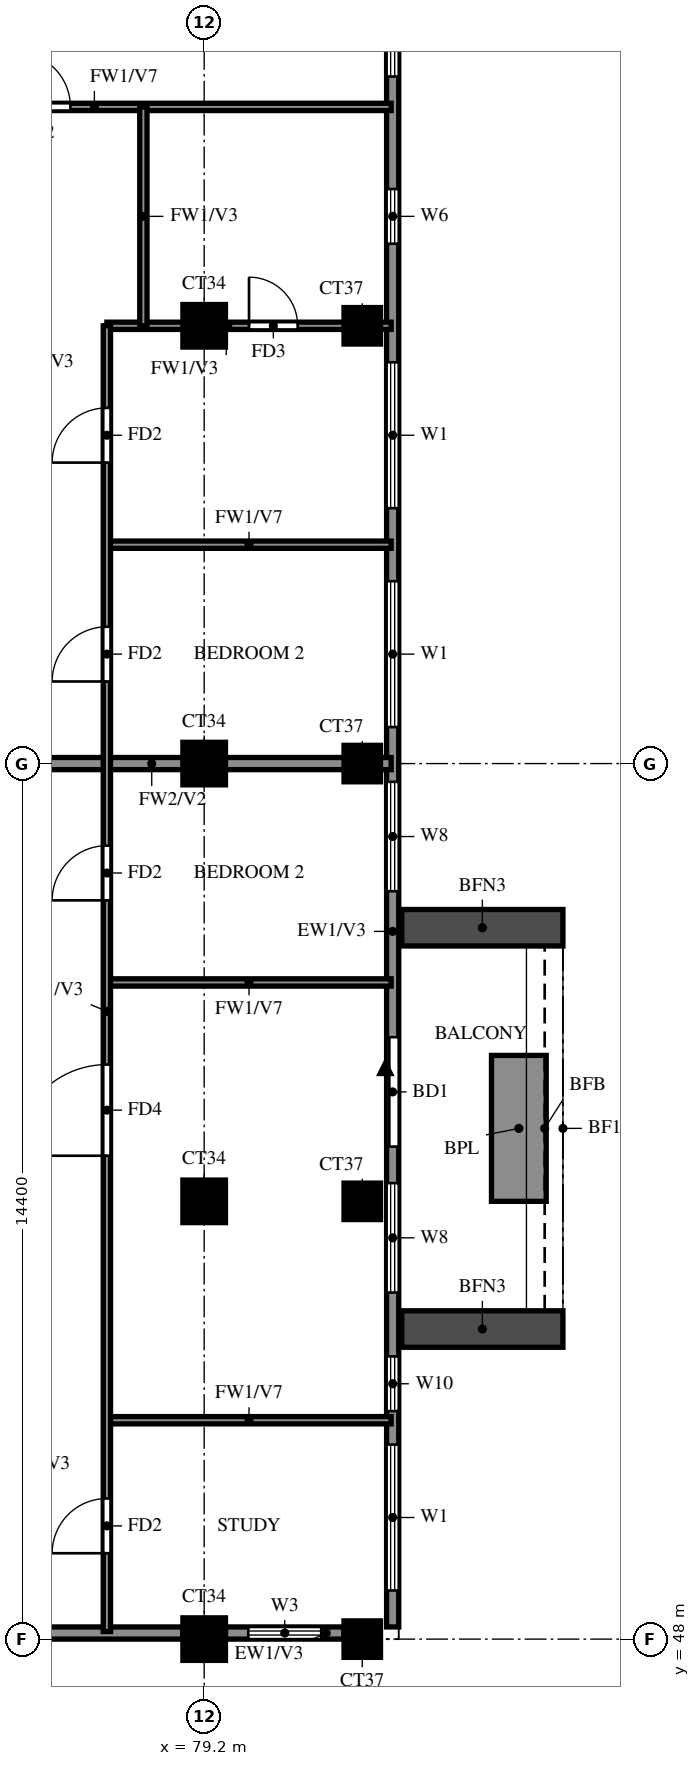
"""IFC4 building model, lengths in metres.
Left out: names, types, materials, properties, quantities, classifications, styles, units other than length and angle.
Written with IfcOpenShell. Run it as: python <this file> out.ifc"""

import sys

from ifc_helpers import new_model, si_unit, direction, frame, frame_2d, origin, origin_2d, place, context, subcontext, project, spatial, rectangle, extrude, source, transform, mapped, element, fill, save


model = new_model("IFC4")
c1 = context("Model", 3, precision=1e-05, world=origin(), true_north=direction((0.0, 1.0)))
c2 = subcontext(c1, "Body", "Model", "MODEL_VIEW")
j1 = project(units=[si_unit("LENGTHUNIT", "METRE"), si_unit("PLANEANGLEUNIT", "RADIAN")], contexts=[c1])
p1 = place(None, origin())
s1 = spatial("IfcSite", under=j1, at=p1, CompositionType="ELEMENT")
p2 = place(p1, origin())
s2 = spatial("IfcBuilding", under=s1, at=p2, CompositionType="ELEMENT")
p3 = place(p2, frame((0.0, 0.0, 264.0)))
s3 = spatial("IfcBuildingStorey", under=s2, at=p3, CompositionType="ELEMENT", Elevation=264.0)
m1 = source(origin(), c2, "Body", "SweptSolid", [
    extrude(rectangle(XDim=0.7, YDim=0.7, at=origin_2d()), origin(), (0.0, 0.0, 1.0), 3.22),
])
p4 = place(p3, frame((79.2, 48.0, 0.0), z_axis=(0.0, 0.0, 1.0), x_axis=(1.0, 0.0, 0.0)))
e1 = element("IfcColumn", 1, at=p4, inside=s3, PredefinedType="COLUMN", context=c2, shape_type="MappedRepresentation", body=[
    mapped(m1, transform((0.0, 0.0, 0.0))),
])
m2 = source(origin(), c2, "Body", "SweptSolid", [
    extrude(rectangle(XDim=0.6, YDim=0.6, at=origin_2d()), origin(), (0.0, 0.0, 1.0), 3.22),
])
p5 = place(p3, frame((81.8, 48.0, 0.0), z_axis=(0.0, 0.0, 1.0), x_axis=(1.0, 0.0, 0.0)))
e2 = element("IfcColumn", 2, at=p5, inside=s3, PredefinedType="COLUMN", context=c2, shape_type="MappedRepresentation", body=[
    mapped(m2, transform((0.0, 0.0, 0.0))),
])
p6 = place(p3, frame((79.2, 55.2, 0.0), z_axis=(0.0, 0.0, 1.0), x_axis=(1.0, 0.0, 0.0)))
e3 = element("IfcColumn", 3, at=p6, inside=s3, PredefinedType="COLUMN", context=c2, shape_type="MappedRepresentation", body=[
    mapped(m1, transform((0.0, 0.0, 0.0))),
])
p7 = place(p3, frame((81.8, 55.2, 0.0), z_axis=(0.0, 0.0, 1.0), x_axis=(1.0, 0.0, 0.0)))
e4 = element("IfcColumn", 4, at=p7, inside=s3, PredefinedType="COLUMN", context=c2, shape_type="MappedRepresentation", body=[
    mapped(m2, transform((0.0, 0.0, 0.0))),
])
p8 = place(p3, frame((79.2, 62.4, 0.0), z_axis=(0.0, 0.0, 1.0), x_axis=(1.0, 0.0, 0.0)))
e5 = element("IfcColumn", 5, at=p8, inside=s3, PredefinedType="COLUMN", context=c2, shape_type="MappedRepresentation", body=[
    mapped(m1, transform((0.0, 0.0, 0.0))),
])
p9 = place(p3, frame((81.8, 62.4, 0.0), z_axis=(0.0, 0.0, 1.0), x_axis=(1.0, 0.0, 0.0)))
e6 = element("IfcColumn", 6, at=p9, inside=s3, PredefinedType="COLUMN", context=c2, shape_type="MappedRepresentation", body=[
    mapped(m2, transform((0.0, 0.0, 0.0))),
])
p10 = place(p3, frame((79.2, 69.6, 0.0), z_axis=(0.0, 0.0, 1.0), x_axis=(1.0, 0.0, 0.0)))
e7 = element("IfcColumn", 7, at=p10, inside=s3, PredefinedType="COLUMN", context=c2, shape_type="MappedRepresentation", body=[
    mapped(m1, transform((0.0, 0.0, 0.0))),
])
p11 = place(p3, frame((81.8, 69.6, 0.0), z_axis=(0.0, 0.0, 1.0), x_axis=(1.0, 0.0, 0.0)))
e8 = element("IfcColumn", 8, at=p11, inside=s3, PredefinedType="COLUMN", context=c2, shape_type="MappedRepresentation", body=[
    mapped(m2, transform((0.0, 0.0, 0.0))),
])
p12 = place(p3, frame((81.907, 39.87, 0.0), z_axis=(0.0, 0.0, 1.0), x_axis=(-0.777936274417, 0.62834318087, 0.0)))
e9 = element("IfcWall", 9, at=p12, inside=s3, PredefinedType="SOLIDWALL", context=c2, shape_type="SweptSolid", body=[
    extrude(rectangle(XDim=13.099, YDim=0.2, at=frame_2d((6.549, 0.0))), origin(), (0.0, 0.0, 1.0), 3.22),
])
p13 = place(p12, frame((9.938, 0.0, 1.5)))
e10 = element("IfcOpeningElement", 10, at=p13, cuts=e9, PredefinedType="OPENING", context=c2, shape_type="SweptSolid", body=[
    extrude(rectangle(XDim=0.9, YDim=0.9, at=frame_2d((0.45, 0.45))), frame((0.0, 0.11, 0.0), z_axis=(0.0, -1.0, 0.0), x_axis=(1.0, 0.0, 0.0)), (0.0, 0.0, 1.0), 0.22),
])
p14 = place(p3, frame((71.987, 48.1, 0.0), z_axis=(0.0, 0.0, 1.0), x_axis=(1.0, 0.0, 0.0)))
e11 = element("IfcWall", 11, at=p14, inside=s3, PredefinedType="SOLIDWALL", context=c2, shape_type="SweptSolid", body=[
    extrude(rectangle(XDim=6.863, YDim=0.2, at=frame_2d((3.432, 0.0))), origin(), (0.0, 0.0, 1.0), 3.22),
])
p15 = place(p14, frame((1.406, 0.0, 1.5)))
e12 = element("IfcOpeningElement", 12, at=p15, cuts=e11, PredefinedType="OPENING", context=c2, shape_type="SweptSolid", body=[
    extrude(rectangle(XDim=0.9, YDim=0.9, at=frame_2d((0.45, 0.45))), frame((0.0, 0.11, 0.0), z_axis=(0.0, -1.0, 0.0), x_axis=(1.0, 0.0, 0.0)), (0.0, 0.0, 1.0), 0.22),
])
p16 = place(p3, frame((79.55, 48.1, 0.0), z_axis=(0.0, 0.0, 1.0), x_axis=(1.0, 0.0, 0.0)))
e13 = element("IfcWall", 13, at=p16, inside=s3, PredefinedType="SOLIDWALL", context=c2, shape_type="SweptSolid", body=[
    extrude(rectangle(XDim=1.95, YDim=0.2, at=frame_2d((0.975, 0.0))), origin(), (0.0, 0.0, 1.0), 3.22),
])
p17 = place(p16, frame((0.375, 0.0, 0.6)))
e14 = element("IfcOpeningElement", 14, at=p17, cuts=e13, PredefinedType="OPENING", context=c2, shape_type="SweptSolid", body=[
    extrude(rectangle(XDim=1.2, YDim=2.4, at=frame_2d((0.6, 1.2))), frame((0.0, 0.11, 0.0), z_axis=(0.0, -1.0, 0.0), x_axis=(1.0, 0.0, 0.0)), (0.0, 0.0, 1.0), 0.22),
])
p18 = place(p3, frame((82.3, 48.2, 0.0), z_axis=(0.0, 0.0, 1.0), x_axis=(0.0, 1.0, 0.0)))
e15 = element("IfcWall", 15, at=p18, inside=s3, PredefinedType="SOLIDWALL", context=c2, shape_type="SweptSolid", body=[
    extrude(rectangle(XDim=28.6, YDim=0.2, at=frame_2d((14.3, 0.0))), origin(), (0.0, 0.0, 1.0), 3.22),
])
p19 = place(p18, frame((7.9, 0.0, 0.0)))
e16 = element("IfcOpeningElement", 16, at=p19, cuts=e15, PredefinedType="OPENING", context=c2, shape_type="SweptSolid", body=[
    extrude(rectangle(XDim=1.8, YDim=2.4, at=frame_2d((0.9, 1.2))), frame((0.0, 0.11, 0.0), z_axis=(0.0, -1.0, 0.0), x_axis=(1.0, 0.0, 0.0)), (0.0, 0.0, 1.0), 0.22),
])
p20 = place(p18, frame((0.6, 0.0, 0.6)))
e17 = element("IfcOpeningElement", 17, at=p20, cuts=e15, PredefinedType="OPENING", context=c2, shape_type="SweptSolid", body=[
    extrude(rectangle(XDim=2.4, YDim=2.4, at=frame_2d((1.2, 1.2))), frame((0.0, 0.11, 0.0), z_axis=(0.0, -1.0, 0.0), x_axis=(1.0, 0.0, 0.0)), (0.0, 0.0, 1.0), 0.22),
])
p21 = place(p18, frame((3.55, 0.0, 0.6)))
e18 = element("IfcOpeningElement", 18, at=p21, cuts=e15, PredefinedType="OPENING", context=c2, shape_type="SweptSolid", body=[
    extrude(rectangle(XDim=0.9, YDim=2.4, at=frame_2d((0.45, 1.2))), frame((0.0, 0.11, 0.0), z_axis=(0.0, -1.0, 0.0), x_axis=(1.0, 0.0, 0.0)), (0.0, 0.0, 1.0), 0.22),
])
p22 = place(p18, frame((5.5, 0.0, 0.6)))
e19 = element("IfcOpeningElement", 19, at=p22, cuts=e15, PredefinedType="OPENING", context=c2, shape_type="SweptSolid", body=[
    extrude(rectangle(XDim=1.8, YDim=2.4, at=frame_2d((0.9, 1.2))), frame((0.0, 0.11, 0.0), z_axis=(0.0, -1.0, 0.0), x_axis=(1.0, 0.0, 0.0)), (0.0, 0.0, 1.0), 0.22),
])
p23 = place(p18, frame((12.1, 0.0, 0.6)))
e20 = element("IfcOpeningElement", 20, at=p23, cuts=e15, PredefinedType="OPENING", context=c2, shape_type="SweptSolid", body=[
    extrude(rectangle(XDim=1.8, YDim=2.4, at=frame_2d((0.9, 1.2))), frame((0.0, 0.11, 0.0), z_axis=(0.0, -1.0, 0.0), x_axis=(1.0, 0.0, 0.0)), (0.0, 0.0, 1.0), 0.22),
])
p24 = place(p18, frame((14.8, 0.0, 0.6)))
e21 = element("IfcOpeningElement", 21, at=p24, cuts=e15, PredefinedType="OPENING", context=c2, shape_type="SweptSolid", body=[
    extrude(rectangle(XDim=2.4, YDim=2.4, at=frame_2d((1.2, 1.2))), frame((0.0, 0.11, 0.0), z_axis=(0.0, -1.0, 0.0), x_axis=(1.0, 0.0, 0.0)), (0.0, 0.0, 1.0), 0.22),
])
p25 = place(p18, frame((18.4, 0.0, 0.6)))
e22 = element("IfcOpeningElement", 22, at=p25, cuts=e15, PredefinedType="OPENING", context=c2, shape_type="SweptSolid", body=[
    extrude(rectangle(XDim=2.4, YDim=2.4, at=frame_2d((1.2, 1.2))), frame((0.0, 0.11, 0.0), z_axis=(0.0, -1.0, 0.0), x_axis=(1.0, 0.0, 0.0)), (0.0, 0.0, 1.0), 0.22),
])
p26 = place(p18, frame((22.75, 0.0, 1.5)))
e23 = element("IfcOpeningElement", 23, at=p26, cuts=e15, PredefinedType="OPENING", context=c2, shape_type="SweptSolid", body=[
    extrude(rectangle(XDim=0.9, YDim=0.9, at=frame_2d((0.45, 0.45))), frame((0.0, 0.11, 0.0), z_axis=(0.0, -1.0, 0.0), x_axis=(1.0, 0.0, 0.0)), (0.0, 0.0, 1.0), 0.22),
])
p27 = place(p18, frame((25.5, 0.0, 0.6)))
e24 = element("IfcOpeningElement", 24, at=p27, cuts=e15, PredefinedType="OPENING", context=c2, shape_type="SweptSolid", body=[
    extrude(rectangle(XDim=2.4, YDim=2.4, at=frame_2d((1.2, 1.2))), frame((0.0, 0.11, 0.0), z_axis=(0.0, -1.0, 0.0), x_axis=(1.0, 0.0, 0.0)), (0.0, 0.0, 1.0), 0.22),
])
for number, where, z_axis, x_axis in (
    (25, (82.45, 53.1, 0.0), (0.0, 0.0, 1.0), (1.0, 0.0, 0.0)),
    (26, (82.45, 59.7, 0.0), (0.0, 0.0, 1.0), (1.0, 0.0, 0.0)),
):
    element("IfcWall", number, at=place(p3, frame(where, z_axis=z_axis, x_axis=x_axis)), inside=s3, PredefinedType="SOLIDWALL", context=c2, shape_type="SweptSolid", body=[
        extrude(rectangle(XDim=2.65, YDim=0.6, at=frame_2d((1.325, 0.0))), origin(), (0.0, 0.0, 1.0), 2.85),
    ])
p28 = place(p3, frame((84.375, 55.2, 0.0), z_axis=(0.0, 0.0, 1.0), x_axis=(0.0, 1.0, 0.0)))
e27 = element("IfcWall", 27, at=p28, inside=s3, PredefinedType="SOLIDWALL", context=c2, shape_type="SweptSolid", body=[
    extrude(rectangle(XDim=2.4, YDim=0.9, at=frame_2d((1.2, 0.0))), origin(), (0.0, 0.0, 1.0), 0.9),
])
p29 = place(p3, frame((74.4, 62.4, 0.0), z_axis=(0.0, 0.0, 1.0), x_axis=(1.0, 0.0, 0.0)))
e28 = element("IfcWall", 28, at=p29, inside=s3, PredefinedType="SOLIDWALL", context=c2, shape_type="SweptSolid", body=[
    extrude(rectangle(XDim=7.875, YDim=0.2, at=frame_2d((3.938, 0.0))), origin(), (0.0, 0.0, 1.0), 3.22),
])
for number, where, z_axis, x_axis in (
    (29, (77.6, 51.6, 0.0), (0.0, 0.0, 1.0), (1.0, 0.0, 0.0)),
    (30, (77.6, 58.8, 0.0), (0.0, 0.0, 1.0), (1.0, 0.0, 0.0)),
    (31, (77.6, 66.0, 0.0), (0.0, 0.0, 1.0), (1.0, 0.0, 0.0)),
):
    element("IfcWall", number, at=place(p3, frame(where, z_axis=z_axis, x_axis=x_axis)), inside=s3, PredefinedType="PARTITIONING", context=c2, shape_type="SweptSolid", body=[
        extrude(rectangle(XDim=4.675, YDim=0.12, at=frame_2d((2.337, 0.0))), origin(), (0.0, 0.0, 1.0), 2.32),
    ])
p30 = place(p3, frame((77.6, 69.6, 0.0), z_axis=(0.0, 0.0, 1.0), x_axis=(1.0, 0.0, 0.0)))
e32 = element("IfcWall", 32, at=p30, inside=s3, PredefinedType="PARTITIONING", context=c2, shape_type="SweptSolid", body=[
    extrude(rectangle(XDim=4.675, YDim=0.12, at=frame_2d((2.337, 0.0))), origin(), (0.0, 0.0, 1.0), 3.22),
])
p31 = place(p30, frame((2.337, 0.0, 0.0)))
e33 = element("IfcOpeningElement", 33, at=p31, cuts=e32, PredefinedType="OPENING", context=c2, shape_type="SweptSolid", body=[
    extrude(rectangle(XDim=0.8, YDim=2.1, at=frame_2d((0.4, 1.05))), frame((0.0, 0.07, 0.0), z_axis=(0.0, -1.0, 0.0), x_axis=(1.0, 0.0, 0.0)), (0.0, 0.0, 1.0), 0.14),
])
p32 = place(p3, frame((72.0, 73.2, 0.0), z_axis=(0.0, 0.0, 1.0), x_axis=(1.0, 0.0, 0.0)))
e34 = element("IfcWall", 34, at=p32, inside=s3, PredefinedType="PARTITIONING", context=c2, shape_type="SweptSolid", body=[
    extrude(rectangle(XDim=10.275, YDim=0.12, at=frame_2d((5.137, 0.0))), origin(), (0.0, 0.0, 1.0), 2.32),
])
p33 = place(p32, frame((4.1, 0.0, 0.0)))
e35 = element("IfcOpeningElement", 35, at=p33, cuts=e34, PredefinedType="OPENING", context=c2, shape_type="SweptSolid", body=[
    extrude(rectangle(XDim=0.9, YDim=2.1, at=frame_2d((0.45, 1.05))), frame((0.0, 0.07, 0.0), z_axis=(0.0, -1.0, 0.0), x_axis=(1.0, 0.0, 0.0)), (0.0, 0.0, 1.0), 0.14),
])
p34 = place(p3, frame((77.6, 48.125, 0.0), z_axis=(0.0, 0.0, 1.0), x_axis=(0.0, 1.0, 0.0)))
e36 = element("IfcWall", 36, at=p34, inside=s3, PredefinedType="PARTITIONING", context=c2, shape_type="SweptSolid", body=[
    extrude(rectangle(XDim=21.475, YDim=0.12, at=frame_2d((10.738, 0.0))), origin(), (0.0, 0.0, 1.0), 3.22),
])
p35 = place(p34, frame((1.288, 0.0, 0.0)))
e37 = element("IfcOpeningElement", 37, at=p35, cuts=e36, PredefinedType="OPENING", context=c2, shape_type="SweptSolid", body=[
    extrude(rectangle(XDim=0.9, YDim=2.1, at=frame_2d((0.45, 1.05))), frame((0.0, 0.07, 0.0), z_axis=(0.0, -1.0, 0.0), x_axis=(1.0, 0.0, 0.0)), (0.0, 0.0, 1.0), 0.14),
])
p36 = place(p34, frame((7.825, 0.0, 0.0)))
e38 = element("IfcOpeningElement", 38, at=p36, cuts=e36, PredefinedType="OPENING", context=c2, shape_type="SweptSolid", body=[
    extrude(rectangle(XDim=1.5, YDim=2.1, at=frame_2d((0.75, 1.05))), frame((0.0, 0.07, 0.0), z_axis=(0.0, -1.0, 0.0), x_axis=(1.0, 0.0, 0.0)), (0.0, 0.0, 1.0), 0.14),
])
p37 = place(p34, frame((12.025, 0.0, 0.0)))
e39 = element("IfcOpeningElement", 39, at=p37, cuts=e36, PredefinedType="OPENING", context=c2, shape_type="SweptSolid", body=[
    extrude(rectangle(XDim=0.9, YDim=2.1, at=frame_2d((0.45, 1.05))), frame((0.0, 0.07, 0.0), z_axis=(0.0, -1.0, 0.0), x_axis=(1.0, 0.0, 0.0)), (0.0, 0.0, 1.0), 0.14),
])
p38 = place(p34, frame((15.625, 0.0, 0.0)))
e40 = element("IfcOpeningElement", 40, at=p38, cuts=e36, PredefinedType="OPENING", context=c2, shape_type="SweptSolid", body=[
    extrude(rectangle(XDim=0.9, YDim=2.1, at=frame_2d((0.45, 1.05))), frame((0.0, 0.07, 0.0), z_axis=(0.0, -1.0, 0.0), x_axis=(1.0, 0.0, 0.0)), (0.0, 0.0, 1.0), 0.14),
])
p39 = place(p34, frame((19.225, 0.0, 0.0)))
e41 = element("IfcOpeningElement", 41, at=p39, cuts=e36, PredefinedType="OPENING", context=c2, shape_type="SweptSolid", body=[
    extrude(rectangle(XDim=0.9, YDim=2.1, at=frame_2d((0.45, 1.05))), frame((0.0, 0.07, 0.0), z_axis=(0.0, -1.0, 0.0), x_axis=(1.0, 0.0, 0.0)), (0.0, 0.0, 1.0), 0.14),
])
p40 = place(p3, frame((78.2, 69.6, 0.0), z_axis=(0.0, 0.0, 1.0), x_axis=(0.0, 1.0, 0.0)))
e42 = element("IfcWall", 42, at=p40, inside=s3, PredefinedType="PARTITIONING", context=c2, shape_type="SweptSolid", body=[
    extrude(rectangle(XDim=3.6, YDim=0.12, at=frame_2d((1.8, 0.0))), origin(), (0.0, 0.0, 1.0), 3.22),
])
p41 = place(p17, origin())
e43 = element("IfcWindow", 43, at=p41, inside=s3, PartitioningType="SINGLE_PANEL", PredefinedType="WINDOW", context=c2, shape_type="SweptSolid", body=[
    extrude(rectangle(XDim=1.2, YDim=2.4, at=frame_2d((0.6, 1.2))), frame((0.0, 0.03, 0.0), z_axis=(0.0, -1.0, 0.0), x_axis=(1.0, 0.0, 0.0)), (0.0, 0.0, 1.0), 0.06),
])
fill(e14, e43)
p42 = place(p19, origin())
e44 = element("IfcDoor", 44, at=p42, inside=s3, OperationType="DOUBLE_DOOR_SLIDING", PredefinedType="DOOR", context=c2, shape_type="SweptSolid", body=[
    extrude(rectangle(XDim=1.8, YDim=2.4, at=frame_2d((0.9, 1.2))), frame((0.0, 0.025, 0.0), z_axis=(0.0, -1.0, 0.0), x_axis=(1.0, 0.0, 0.0)), (0.0, 0.0, 1.0), 0.05),
])
fill(e16, e44)
p43 = place(p20, origin())
e45 = element("IfcWindow", 45, at=p43, inside=s3, PartitioningType="DOUBLE_PANEL_VERTICAL", PredefinedType="WINDOW", context=c2, shape_type="SweptSolid", body=[
    extrude(rectangle(XDim=2.4, YDim=2.4, at=frame_2d((1.2, 1.2))), frame((0.0, 0.03, 0.0), z_axis=(0.0, -1.0, 0.0), x_axis=(1.0, 0.0, 0.0)), (0.0, 0.0, 1.0), 0.06),
])
fill(e17, e45)
p44 = place(p21, origin())
e46 = element("IfcWindow", 46, at=p44, inside=s3, PartitioningType="SINGLE_PANEL", PredefinedType="WINDOW", context=c2, shape_type="SweptSolid", body=[
    extrude(rectangle(XDim=0.9, YDim=2.4, at=frame_2d((0.45, 1.2))), frame((0.0, 0.03, 0.0), z_axis=(0.0, -1.0, 0.0), x_axis=(1.0, 0.0, 0.0)), (0.0, 0.0, 1.0), 0.06),
])
fill(e18, e46)
p45 = place(p22, origin())
e47 = element("IfcWindow", 47, at=p45, inside=s3, PartitioningType="DOUBLE_PANEL_VERTICAL", PredefinedType="WINDOW", context=c2, shape_type="SweptSolid", body=[
    extrude(rectangle(XDim=1.8, YDim=2.4, at=frame_2d((0.9, 1.2))), frame((0.0, 0.03, 0.0), z_axis=(0.0, -1.0, 0.0), x_axis=(1.0, 0.0, 0.0)), (0.0, 0.0, 1.0), 0.06),
])
fill(e19, e47)
p46 = place(p23, origin())
e48 = element("IfcWindow", 48, at=p46, inside=s3, PartitioningType="DOUBLE_PANEL_VERTICAL", PredefinedType="WINDOW", context=c2, shape_type="SweptSolid", body=[
    extrude(rectangle(XDim=1.8, YDim=2.4, at=frame_2d((0.9, 1.2))), frame((0.0, 0.03, 0.0), z_axis=(0.0, -1.0, 0.0), x_axis=(1.0, 0.0, 0.0)), (0.0, 0.0, 1.0), 0.06),
])
fill(e20, e48)
p47 = place(p24, origin())
e49 = element("IfcWindow", 49, at=p47, inside=s3, PartitioningType="DOUBLE_PANEL_VERTICAL", PredefinedType="WINDOW", context=c2, shape_type="SweptSolid", body=[
    extrude(rectangle(XDim=2.4, YDim=2.4, at=frame_2d((1.2, 1.2))), frame((0.0, 0.03, 0.0), z_axis=(0.0, -1.0, 0.0), x_axis=(1.0, 0.0, 0.0)), (0.0, 0.0, 1.0), 0.06),
])
fill(e21, e49)
p48 = place(p25, origin())
e50 = element("IfcWindow", 50, at=p48, inside=s3, PartitioningType="DOUBLE_PANEL_VERTICAL", PredefinedType="WINDOW", context=c2, shape_type="SweptSolid", body=[
    extrude(rectangle(XDim=2.4, YDim=2.4, at=frame_2d((1.2, 1.2))), frame((0.0, 0.03, 0.0), z_axis=(0.0, -1.0, 0.0), x_axis=(1.0, 0.0, 0.0)), (0.0, 0.0, 1.0), 0.06),
])
fill(e22, e50)
p49 = place(p26, origin())
e51 = element("IfcWindow", 51, at=p49, inside=s3, PartitioningType="SINGLE_PANEL", PredefinedType="WINDOW", context=c2, shape_type="SweptSolid", body=[
    extrude(rectangle(XDim=0.9, YDim=0.9, at=frame_2d((0.45, 0.45))), frame((0.0, 0.03, 0.0), z_axis=(0.0, -1.0, 0.0), x_axis=(1.0, 0.0, 0.0)), (0.0, 0.0, 1.0), 0.06),
])
fill(e23, e51)
p50 = place(p27, origin())
e52 = element("IfcWindow", 52, at=p50, inside=s3, PartitioningType="DOUBLE_PANEL_VERTICAL", PredefinedType="WINDOW", context=c2, shape_type="SweptSolid", body=[
    extrude(rectangle(XDim=2.4, YDim=2.4, at=frame_2d((1.2, 1.2))), frame((0.0, 0.03, 0.0), z_axis=(0.0, -1.0, 0.0), x_axis=(1.0, 0.0, 0.0)), (0.0, 0.0, 1.0), 0.06),
])
fill(e24, e52)
p51 = place(p35, origin())
e53 = element("IfcDoor", 53, at=p51, inside=s3, OperationType="SINGLE_SWING_RIGHT", PredefinedType="DOOR", context=c2, shape_type="SweptSolid", body=[
    extrude(rectangle(XDim=0.9, YDim=2.1, at=frame_2d((0.45, 1.05))), frame((0.0, 0.025, 0.0), z_axis=(0.0, -1.0, 0.0), x_axis=(1.0, 0.0, 0.0)), (0.0, 0.0, 1.0), 0.05),
])
fill(e37, e53)
p52 = place(p36, origin())
e54 = element("IfcDoor", 54, at=p52, inside=s3, OperationType="SINGLE_SWING_RIGHT", PredefinedType="DOOR", context=c2, shape_type="SweptSolid", body=[
    extrude(rectangle(XDim=1.5, YDim=2.1, at=frame_2d((0.75, 1.05))), frame((0.0, 0.025, 0.0), z_axis=(0.0, -1.0, 0.0), x_axis=(1.0, 0.0, 0.0)), (0.0, 0.0, 1.0), 0.05),
])
fill(e38, e54)
p53 = place(p37, origin())
e55 = element("IfcDoor", 55, at=p53, inside=s3, OperationType="SINGLE_SWING_LEFT", PredefinedType="DOOR", context=c2, shape_type="SweptSolid", body=[
    extrude(rectangle(XDim=0.9, YDim=2.1, at=frame_2d((0.45, 1.05))), frame((0.0, 0.025, 0.0), z_axis=(0.0, -1.0, 0.0), x_axis=(1.0, 0.0, 0.0)), (0.0, 0.0, 1.0), 0.05),
])
fill(e39, e55)
p54 = place(p38, origin())
e56 = element("IfcDoor", 56, at=p54, inside=s3, OperationType="SINGLE_SWING_RIGHT", PredefinedType="DOOR", context=c2, shape_type="SweptSolid", body=[
    extrude(rectangle(XDim=0.9, YDim=2.1, at=frame_2d((0.45, 1.05))), frame((0.0, 0.025, 0.0), z_axis=(0.0, -1.0, 0.0), x_axis=(1.0, 0.0, 0.0)), (0.0, 0.0, 1.0), 0.05),
])
fill(e40, e56)
p55 = place(p39, origin())
e57 = element("IfcDoor", 57, at=p55, inside=s3, OperationType="SINGLE_SWING_LEFT", PredefinedType="DOOR", context=c2, shape_type="SweptSolid", body=[
    extrude(rectangle(XDim=0.9, YDim=2.1, at=frame_2d((0.45, 1.05))), frame((0.0, 0.025, 0.0), z_axis=(0.0, -1.0, 0.0), x_axis=(1.0, 0.0, 0.0)), (0.0, 0.0, 1.0), 0.05),
])
fill(e41, e57)
p56 = place(p31, origin())
e58 = element("IfcDoor", 58, at=p56, inside=s3, OperationType="SINGLE_SWING_RIGHT", PredefinedType="DOOR", context=c2, shape_type="SweptSolid", body=[
    extrude(rectangle(XDim=0.8, YDim=2.1, at=frame_2d((0.4, 1.05))), frame((0.0, 0.025, 0.0), z_axis=(0.0, -1.0, 0.0), x_axis=(1.0, 0.0, 0.0)), (0.0, 0.0, 1.0), 0.05),
])
fill(e33, e58)
p57 = place(p33, origin())
e59 = element("IfcDoor", 59, at=p57, inside=s3, OperationType="SINGLE_SWING_RIGHT", PredefinedType="DOOR", context=c2, shape_type="SweptSolid", body=[
    extrude(rectangle(XDim=0.9, YDim=2.1, at=frame_2d((0.45, 1.05))), frame((0.0, 0.025, 0.0), z_axis=(0.0, -1.0, 0.0), x_axis=(1.0, 0.0, 0.0)), (0.0, 0.0, 1.0), 0.05),
])
fill(e35, e59)
save(model, sys.argv[1])
